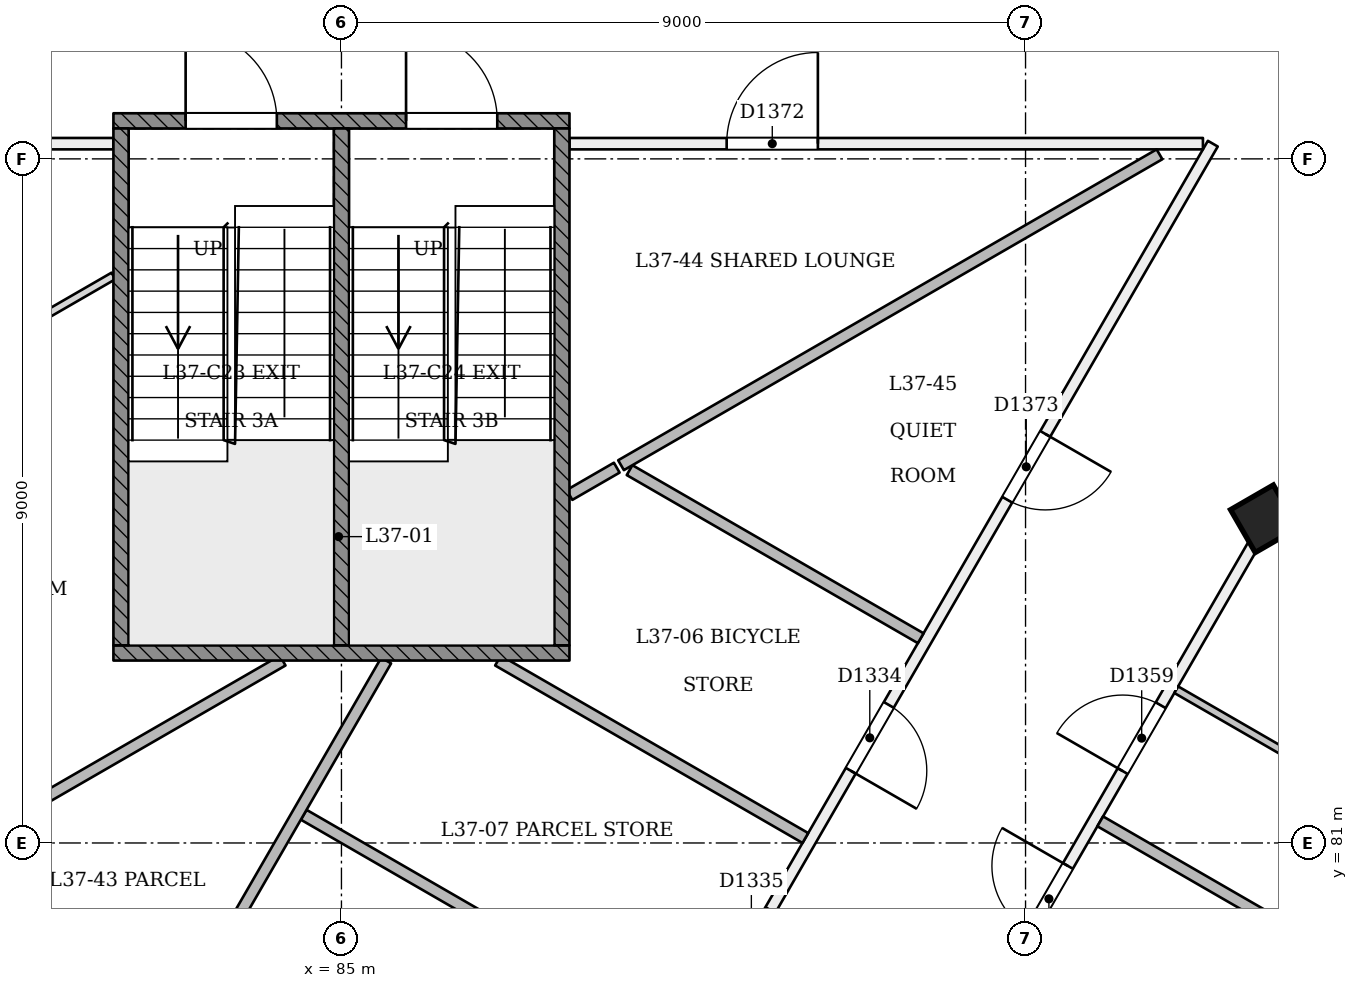
"""IFC4 building model, lengths in metres.
Left out: names, types, materials, properties, quantities, classifications, styles, units other than length and angle.
Written with IfcOpenShell. Run it as: python <this file> out.ifc"""

import sys

from ifc_helpers import new_model, si_unit, direction, frame, frame_2d, origin, origin_2d, place, context, subcontext, project, spatial, rectangle, extrude, element, fill, save


model = new_model("IFC4")
c1 = context("Model", 3, precision=1e-05, world=origin(), true_north=direction((0.0, 1.0)))
c2 = subcontext(c1, "Body", "Model", "MODEL_VIEW")
j1 = project(units=[si_unit("LENGTHUNIT", "METRE"), si_unit("PLANEANGLEUNIT", "RADIAN")], contexts=[c1])
p1 = place(None, origin())
s1 = spatial("IfcSite", under=j1, at=p1, CompositionType="ELEMENT")
p2 = place(p1, origin())
s2 = spatial("IfcBuilding", under=s1, at=p2, CompositionType="ELEMENT")
p3 = place(p2, frame((0.0, 0.0, 145.8)))
s3 = spatial("IfcBuildingStorey", under=s2, at=p3, CompositionType="ELEMENT", Elevation=145.8)
p4 = place(p3, frame((97.168, 85.218, -0.02), z_axis=(-0.02222134892, 0.038480872521, 0.999012229206), x_axis=(-0.500174592943, -0.865639497158, 0.022217955235)))
e1 = element("IfcColumn", 1, at=p4, inside=s3, PredefinedType="COLUMN", context=c2, shape_type="SweptSolid", body=[
    extrude(rectangle(XDim=0.65, YDim=0.65, at=origin_2d()), origin(), (0.0, 0.0, 1.0), 3.604),
])
p5 = place(p3, frame((73.666, 90.2, 0.0), z_axis=(0.0, 0.0, 1.0), x_axis=(1.0, 0.0, 0.0)))
e2 = element("IfcWall", 2, at=p5, inside=s3, PredefinedType="PARTITIONING", context=c2, shape_type="SweptSolid", body=[
    extrude(rectangle(XDim=8.334, YDim=0.15, at=frame_2d((4.167, 0.0))), origin(), (0.0, 0.0, 1.0), 3.15),
])
p6 = place(p5, frame((5.452, 0.0, 0.0)))
e3 = element("IfcOpeningElement", 3, at=p6, cuts=e2, PredefinedType="OPENING", context=c2, shape_type="SweptSolid", body=[
    extrude(rectangle(XDim=0.9, YDim=2.1, at=frame_2d((0.45, 1.05))), frame((0.0, 0.085, 0.0), z_axis=(0.0, -1.0, 0.0), x_axis=(1.0, 0.0, 0.0)), (0.0, 0.0, 1.0), 0.171),
])
p7 = place(p3, frame((96.464, 90.2, 0.0), z_axis=(0.0, 0.0, 1.0), x_axis=(-0.50000081944, -0.86602493068, 0.0)))
e4 = element("IfcWall", 4, at=p7, inside=s3, PredefinedType="PARTITIONING", context=c2, shape_type="SweptSolid", body=[
    extrude(rectangle(XDim=22.928, YDim=0.15, at=frame_2d((11.464, 0.0))), origin(), (0.0, 0.0, 1.0), 3.15),
])
p8 = place(p7, frame((15.191, 0.0, 0.0)))
e5 = element("IfcOpeningElement", 5, at=p8, cuts=e4, PredefinedType="OPENING", context=c2, shape_type="SweptSolid", body=[
    extrude(rectangle(XDim=0.9, YDim=2.1, at=frame_2d((0.45, 1.05))), frame((0.0, 0.085, 0.0), z_axis=(0.0, -1.0, 0.0), x_axis=(1.0, 0.0, 0.0)), (0.0, 0.0, 1.0), 0.171),
])
p9 = place(p7, frame((19.386, 0.0, 0.0)))
e6 = element("IfcOpeningElement", 6, at=p9, cuts=e4, PredefinedType="OPENING", context=c2, shape_type="SweptSolid", body=[
    extrude(rectangle(XDim=1.0, YDim=2.1, at=frame_2d((0.5, 1.05))), frame((0.0, 0.085, 0.0), z_axis=(0.0, -1.0, 0.0), x_axis=(1.0, 0.0, 0.0)), (0.0, 0.0, 1.0), 0.171),
])
p10 = place(p7, frame((8.526, 0.0, 0.0)))
e7 = element("IfcOpeningElement", 7, at=p10, cuts=e4, PredefinedType="OPENING", context=c2, shape_type="SweptSolid", body=[
    extrude(rectangle(XDim=1.0, YDim=2.1, at=frame_2d((0.5, 1.05))), frame((0.0, 0.085, 0.0), z_axis=(0.0, -1.0, 0.0), x_axis=(1.0, 0.0, 0.0)), (0.0, 0.0, 1.0), 0.171),
])
p11 = place(p7, frame((11.642, 0.0, 0.0)))
e8 = element("IfcOpeningElement", 8, at=p11, cuts=e4, PredefinedType="OPENING", context=c2, shape_type="SweptSolid", body=[
    extrude(rectangle(XDim=1.0, YDim=2.1, at=frame_2d((0.5, 1.05))), frame((0.0, 0.085, 0.0), z_axis=(0.0, -1.0, 0.0), x_axis=(1.0, 0.0, 0.0)), (0.0, 0.0, 1.0), 0.171),
])
p12 = place(p7, frame((4.409, 0.0, 0.0)))
e9 = element("IfcOpeningElement", 9, at=p12, cuts=e4, PredefinedType="OPENING", context=c2, shape_type="SweptSolid", body=[
    extrude(rectangle(XDim=1.0, YDim=2.1, at=frame_2d((0.5, 1.05))), frame((0.0, 0.085, 0.0), z_axis=(0.0, -1.0, 0.0), x_axis=(1.0, 0.0, 0.0)), (0.0, 0.0, 1.0), 0.171),
])
p13 = place(p3, frame((84.935, 70.457, 0.0), z_axis=(0.0, 0.0, 1.0), x_axis=(-0.50000209693, 0.866024193118, 0.0)))
e10 = element("IfcWall", 10, at=p13, inside=s3, PredefinedType="PARTITIONING", context=c2, shape_type="SweptSolid", body=[
    extrude(rectangle(XDim=22.798, YDim=0.15, at=frame_2d((11.399, 0.0))), origin(), (0.0, 0.0, 1.0), 3.15),
])
p14 = place(p13, frame((19.283, 0.0, 0.0)))
e11 = element("IfcOpeningElement", 11, at=p14, cuts=e10, PredefinedType="OPENING", context=c2, shape_type="SweptSolid", body=[
    extrude(rectangle(XDim=1.0, YDim=2.1, at=frame_2d((0.5, 1.05))), frame((0.0, 0.085, 0.0), z_axis=(0.0, -1.0, 0.0), x_axis=(1.0, 0.0, 0.0)), (0.0, 0.0, 1.0), 0.171),
])
p15 = place(p13, frame((13.973, 0.0, 0.0)))
e12 = element("IfcOpeningElement", 12, at=p15, cuts=e10, PredefinedType="OPENING", context=c2, shape_type="SweptSolid", body=[
    extrude(rectangle(XDim=1.0, YDim=2.1, at=frame_2d((0.5, 1.05))), frame((0.0, 0.085, 0.0), z_axis=(0.0, -1.0, 0.0), x_axis=(1.0, 0.0, 0.0)), (0.0, 0.0, 1.0), 0.171),
])
p16 = place(p13, frame((5.691, 0.0, 0.0)))
e13 = element("IfcOpeningElement", 13, at=p16, cuts=e10, PredefinedType="OPENING", context=c2, shape_type="SweptSolid", body=[
    extrude(rectangle(XDim=1.0, YDim=2.1, at=frame_2d((0.5, 1.05))), frame((0.0, 0.085, 0.0), z_axis=(0.0, -1.0, 0.0), x_axis=(1.0, 0.0, 0.0)), (0.0, 0.0, 1.0), 0.171),
])
p17 = place(p13, frame((9.424, 0.0, 0.0)))
e14 = element("IfcOpeningElement", 14, at=p17, cuts=e10, PredefinedType="OPENING", context=c2, shape_type="SweptSolid", body=[
    extrude(rectangle(XDim=1.0, YDim=2.1, at=frame_2d((0.5, 1.05))), frame((0.0, 0.085, 0.0), z_axis=(0.0, -1.0, 0.0), x_axis=(1.0, 0.0, 0.0)), (0.0, 0.0, 1.0), 0.171),
])
p18 = place(p3, frame((66.082, 96.91, 0.0), z_axis=(0.0, 0.0, 1.0), x_axis=(0.500001949747, -0.866024278094, 0.0)))
e15 = element("IfcWall", 15, at=p18, inside=s3, PredefinedType="PARTITIONING", context=c2, shape_type="SweptSolid", body=[
    extrude(rectangle(XDim=37.705, YDim=0.15, at=frame_2d((18.853, 0.0))), origin(), (0.0, 0.0, 1.0), 2.75),
])
p19 = place(p18, frame((1.75, 0.0, 0.0)))
e16 = element("IfcOpeningElement", 16, at=p19, cuts=e15, PredefinedType="OPENING", context=c2, shape_type="SweptSolid", body=[
    extrude(rectangle(XDim=1.0, YDim=2.1, at=frame_2d((0.5, 1.05))), frame((0.0, 0.085, 0.0), z_axis=(0.0, -1.0, 0.0), x_axis=(1.0, 0.0, 0.0)), (0.0, 0.0, 1.0), 0.171),
])
p20 = place(p18, frame((7.329, 0.0, 0.0)))
e17 = element("IfcOpeningElement", 17, at=p20, cuts=e15, PredefinedType="OPENING", context=c2, shape_type="SweptSolid", body=[
    extrude(rectangle(XDim=1.1, YDim=2.1, at=frame_2d((0.55, 1.05))), frame((0.0, 0.085, 0.0), z_axis=(0.0, -1.0, 0.0), x_axis=(1.0, 0.0, 0.0)), (0.0, 0.0, 1.0), 0.171),
])
p21 = place(p18, frame((9.72, 0.0, 0.0)))
e18 = element("IfcOpeningElement", 18, at=p21, cuts=e15, PredefinedType="OPENING", context=c2, shape_type="SweptSolid", body=[
    extrude(rectangle(XDim=1.0, YDim=2.1, at=frame_2d((0.5, 1.05))), frame((0.0, 0.085, 0.0), z_axis=(0.0, -1.0, 0.0), x_axis=(1.0, 0.0, 0.0)), (0.0, 0.0, 1.0), 0.171),
])
p22 = place(p18, frame((16.28, 0.0, 0.0)))
e19 = element("IfcOpeningElement", 19, at=p22, cuts=e15, PredefinedType="OPENING", context=c2, shape_type="SweptSolid", body=[
    extrude(rectangle(XDim=1.0, YDim=2.1, at=frame_2d((0.5, 1.05))), frame((0.0, 0.085, 0.0), z_axis=(0.0, -1.0, 0.0), x_axis=(1.0, 0.0, 0.0)), (0.0, 0.0, 1.0), 0.171),
])
p23 = place(p18, frame((18.72, 0.0, 0.0)))
e20 = element("IfcOpeningElement", 20, at=p23, cuts=e15, PredefinedType="OPENING", context=c2, shape_type="SweptSolid", body=[
    extrude(rectangle(XDim=1.0, YDim=2.1, at=frame_2d((0.5, 1.05))), frame((0.0, 0.085, 0.0), z_axis=(0.0, -1.0, 0.0), x_axis=(1.0, 0.0, 0.0)), (0.0, 0.0, 1.0), 0.171),
])
p24 = place(p18, frame((25.28, 0.0, 0.0)))
e21 = element("IfcOpeningElement", 21, at=p24, cuts=e15, PredefinedType="OPENING", context=c2, shape_type="SweptSolid", body=[
    extrude(rectangle(XDim=1.0, YDim=2.1, at=frame_2d((0.5, 1.05))), frame((0.0, 0.085, 0.0), z_axis=(0.0, -1.0, 0.0), x_axis=(1.0, 0.0, 0.0)), (0.0, 0.0, 1.0), 0.171),
])
p25 = place(p18, frame((27.72, 0.0, 0.0)))
e22 = element("IfcOpeningElement", 22, at=p25, cuts=e15, PredefinedType="OPENING", context=c2, shape_type="SweptSolid", body=[
    extrude(rectangle(XDim=1.0, YDim=2.1, at=frame_2d((0.5, 1.05))), frame((0.0, 0.085, 0.0), z_axis=(0.0, -1.0, 0.0), x_axis=(1.0, 0.0, 0.0)), (0.0, 0.0, 1.0), 0.171),
])
p26 = place(p18, frame((34.329, 0.0, 0.0)))
e23 = element("IfcOpeningElement", 23, at=p26, cuts=e15, PredefinedType="OPENING", context=c2, shape_type="SweptSolid", body=[
    extrude(rectangle(XDim=1.1, YDim=2.1, at=frame_2d((0.55, 1.05))), frame((0.0, 0.085, 0.0), z_axis=(0.0, -1.0, 0.0), x_axis=(1.0, 0.0, 0.0)), (0.0, 0.0, 1.0), 0.171),
])
p27 = place(p3, frame((85.0, 64.144, 0.0), z_axis=(0.0, 0.0, 1.0), x_axis=(0.50000053273, 0.866025096212, 0.0)))
e24 = element("IfcWall", 24, at=p27, inside=s3, PredefinedType="PARTITIONING", context=c2, shape_type="SweptSolid", body=[
    extrude(rectangle(XDim=39.671, YDim=0.15, at=frame_2d((19.835, 0.0))), origin(), (0.0, 0.0, 1.0), 2.75),
])
p28 = place(p27, frame((0.618, 0.0, 0.0)))
e25 = element("IfcOpeningElement", 25, at=p28, cuts=e24, PredefinedType="OPENING", context=c2, shape_type="SweptSolid", body=[
    extrude(rectangle(XDim=1.2, YDim=2.1, at=frame_2d((0.6, 1.05))), frame((0.0, 0.085, 0.0), z_axis=(0.0, -1.0, 0.0), x_axis=(1.0, 0.0, 0.0)), (0.0, 0.0, 1.0), 0.171),
])
p29 = place(p27, frame((9.115, 0.0, 0.0)))
e26 = element("IfcOpeningElement", 26, at=p29, cuts=e24, PredefinedType="OPENING", context=c2, shape_type="SweptSolid", body=[
    extrude(rectangle(XDim=1.0, YDim=2.1, at=frame_2d((0.5, 1.05))), frame((0.0, 0.085, 0.0), z_axis=(0.0, -1.0, 0.0), x_axis=(1.0, 0.0, 0.0)), (0.0, 0.0, 1.0), 0.171),
])
p30 = place(p27, frame((11.556, 0.0, 0.0)))
e27 = element("IfcOpeningElement", 27, at=p30, cuts=e24, PredefinedType="OPENING", context=c2, shape_type="SweptSolid", body=[
    extrude(rectangle(XDim=1.0, YDim=2.1, at=frame_2d((0.5, 1.05))), frame((0.0, 0.085, 0.0), z_axis=(0.0, -1.0, 0.0), x_axis=(1.0, 0.0, 0.0)), (0.0, 0.0, 1.0), 0.171),
])
p31 = place(p27, frame((18.115, 0.0, 0.0)))
e28 = element("IfcOpeningElement", 28, at=p31, cuts=e24, PredefinedType="OPENING", context=c2, shape_type="SweptSolid", body=[
    extrude(rectangle(XDim=1.0, YDim=2.1, at=frame_2d((0.5, 1.05))), frame((0.0, 0.085, 0.0), z_axis=(0.0, -1.0, 0.0), x_axis=(1.0, 0.0, 0.0)), (0.0, 0.0, 1.0), 0.171),
])
p32 = place(p27, frame((20.556, 0.0, 0.0)))
e29 = element("IfcOpeningElement", 29, at=p32, cuts=e24, PredefinedType="OPENING", context=c2, shape_type="SweptSolid", body=[
    extrude(rectangle(XDim=1.0, YDim=2.1, at=frame_2d((0.5, 1.05))), frame((0.0, 0.085, 0.0), z_axis=(0.0, -1.0, 0.0), x_axis=(1.0, 0.0, 0.0)), (0.0, 0.0, 1.0), 0.171),
])
p33 = place(p27, frame((27.115, 0.0, 0.0)))
e30 = element("IfcOpeningElement", 30, at=p33, cuts=e24, PredefinedType="OPENING", context=c2, shape_type="SweptSolid", body=[
    extrude(rectangle(XDim=1.0, YDim=2.1, at=frame_2d((0.5, 1.05))), frame((0.0, 0.085, 0.0), z_axis=(0.0, -1.0, 0.0), x_axis=(1.0, 0.0, 0.0)), (0.0, 0.0, 1.0), 0.171),
])
p34 = place(p27, frame((30.585, 0.0, 0.0)))
e31 = element("IfcOpeningElement", 31, at=p34, cuts=e24, PredefinedType="OPENING", context=c2, shape_type="SweptSolid", body=[
    extrude(rectangle(XDim=1.0, YDim=2.1, at=frame_2d((0.5, 1.05))), frame((0.0, 0.085, 0.0), z_axis=(0.0, -1.0, 0.0), x_axis=(1.0, 0.0, 0.0)), (0.0, 0.0, 1.0), 0.171),
])
p35 = place(p27, frame((36.164, 0.0, 0.0)))
e32 = element("IfcOpeningElement", 32, at=p35, cuts=e24, PredefinedType="OPENING", context=c2, shape_type="SweptSolid", body=[
    extrude(rectangle(XDim=1.1, YDim=2.1, at=frame_2d((0.55, 1.05))), frame((0.0, 0.085, 0.0), z_axis=(0.0, -1.0, 0.0), x_axis=(1.0, 0.0, 0.0)), (0.0, 0.0, 1.0), 0.171),
])
p36 = place(p27, frame((38.271, 0.0, 0.0)))
e33 = element("IfcOpeningElement", 33, at=p36, cuts=e24, PredefinedType="OPENING", context=c2, shape_type="SweptSolid", body=[
    extrude(rectangle(XDim=1.2, YDim=2.1, at=frame_2d((0.6, 1.05))), frame((0.0, 0.085, 0.0), z_axis=(0.0, -1.0, 0.0), x_axis=(1.0, 0.0, 0.0)), (0.0, 0.0, 1.0), 0.171),
])
p37 = place(p3, frame((88.0, 90.2, 0.0), z_axis=(0.0, 0.0, 1.0), x_axis=(1.0, 0.0, 0.0)))
e34 = element("IfcWall", 34, at=p37, inside=s3, PredefinedType="PARTITIONING", context=c2, shape_type="SweptSolid", body=[
    extrude(rectangle(XDim=8.334, YDim=0.15, at=frame_2d((4.167, 0.0))), origin(), (0.0, 0.0, 1.0), 3.15),
])
p38 = place(p37, frame((2.068, 0.0, 0.0)))
e35 = element("IfcOpeningElement", 35, at=p38, cuts=e34, PredefinedType="OPENING", context=c2, shape_type="SweptSolid", body=[
    extrude(rectangle(XDim=1.2, YDim=2.1, at=frame_2d((0.6, 1.05))), frame((0.0, 0.085, 0.0), z_axis=(0.0, -1.0, 0.0), x_axis=(1.0, 0.0, 0.0)), (0.0, 0.0, 1.0), 0.171),
])
p39 = place(p3, frame((77.71, 85.983, 0.0), z_axis=(0.0, 0.0, 1.0), x_axis=(0.866029649098, 0.49999264683, 0.0)))
e36 = element("IfcWall", 36, at=p39, inside=s3, PredefinedType="PARTITIONING", context=c2, shape_type="SweptSolid", body=[
    extrude(rectangle(XDim=4.954, YDim=0.1, at=frame_2d((2.477, 0.0))), origin(), (0.0, 0.0, 1.0), 3.15),
])
p40 = place(p3, frame((87.06, 83.4, 0.0), z_axis=(0.0, 0.0, 1.0), x_axis=(0.866040176992, -0.499974411181, 0.0)))
e37 = element("IfcWall", 37, at=p40, inside=s3, PredefinedType="PARTITIONING", context=c2, shape_type="SweptSolid", body=[
    extrude(rectangle(XDim=4.669, YDim=0.15, at=frame_2d((2.334, 0.0))), origin(), (0.0, 0.0, 1.0), 3.15),
])
p41 = place(p3, frame((88.622, 85.938, 0.0), z_axis=(0.0, 0.0, 1.0), x_axis=(-0.866100656052, -0.499869636591, 0.0)))
e38 = element("IfcWall", 38, at=p41, inside=s3, PredefinedType="PARTITIONING", context=c2, shape_type="SweptSolid", body=[
    extrude(rectangle(XDim=0.718, YDim=0.15, at=frame_2d((0.359, 0.0))), origin(), (0.0, 0.0, 1.0), 3.15),
])
p42 = place(p3, frame((92.621, 83.694, 0.0), z_axis=(0.0, 0.0, 1.0), x_axis=(-0.866012759228, 0.500021900375, 0.0)))
e39 = element("IfcWall", 39, at=p42, inside=s3, PredefinedType="PARTITIONING", context=c2, shape_type="SweptSolid", body=[
    extrude(rectangle(XDim=4.423, YDim=0.15, at=frame_2d((2.211, 0.0))), origin(), (0.0, 0.0, 1.0), 3.15),
])
p43 = place(p3, frame((84.503, 81.371, 0.0), z_axis=(0.0, 0.0, 1.0), x_axis=(0.866042852854, -0.499969776107, 0.0)))
e40 = element("IfcWall", 40, at=p43, inside=s3, PredefinedType="PARTITIONING", context=c2, shape_type="SweptSolid", body=[
    extrude(rectangle(XDim=2.934, YDim=0.15, at=frame_2d((1.467, 0.0))), origin(), (0.0, 0.0, 1.0), 3.15),
])
p44 = place(p3, frame((100.478, 78.112, 0.0), z_axis=(0.0, 0.0, 1.0), x_axis=(-0.866025401434, 0.500000004071, 0.0)))
e41 = element("IfcWall", 41, at=p44, inside=s3, PredefinedType="PARTITIONING", context=c2, shape_type="SweptSolid", body=[
    extrude(rectangle(XDim=6.345, YDim=0.15, at=frame_2d((3.173, 0.0))), origin(), (0.0, 0.0, 1.0), 2.65),
])
p45 = place(p3, frame((98.429, 81.604, 0.0), z_axis=(0.0, 0.0, 1.0), x_axis=(-0.866011447264, 0.500024172624, 0.0)))
e42 = element("IfcWall", 42, at=p45, inside=s3, PredefinedType="PARTITIONING", context=c2, shape_type="SweptSolid", body=[
    extrude(rectangle(XDim=2.825, YDim=0.1, at=frame_2d((1.413, 0.0))), origin(), (0.0, 0.0, 1.0), 3.15),
])
p46 = place(p3, frame((99.636, 83.794, 0.0), z_axis=(0.0, 0.0, 1.0), x_axis=(-0.866042014628, 0.499971228071, 0.0)))
e43 = element("IfcWall", 43, at=p46, inside=s3, PredefinedType="PARTITIONING", context=c2, shape_type="SweptSolid", body=[
    extrude(rectangle(XDim=2.775, YDim=0.1, at=frame_2d((1.388, 0.0))), origin(), (0.0, 0.0, 1.0), 2.75),
])
p47 = place(p3, frame((79.218, 80.508, 0.0), z_axis=(0.0, 0.0, 1.0), x_axis=(0.866031632846, 0.499989210794, 0.0)))
e44 = element("IfcWall", 44, at=p47, inside=s3, PredefinedType="PARTITIONING", context=c2, shape_type="SweptSolid", body=[
    extrude(rectangle(XDim=5.783, YDim=0.15, at=frame_2d((2.892, 0.0))), origin(), (0.0, 0.0, 1.0), 3.15),
])
p48 = place(p3, frame((85.588, 83.4, 0.0), z_axis=(0.0, 0.0, 1.0), x_axis=(-0.500000846469, -0.866024915075, 0.0)))
e45 = element("IfcWall", 45, at=p48, inside=s3, PredefinedType="PARTITIONING", context=c2, shape_type="SweptSolid", body=[
    extrude(rectangle(XDim=7.996, YDim=0.15, at=frame_2d((3.998, 0.0))), origin(), (0.0, 0.0, 1.0), 3.15),
])
p49 = place(p3, frame((88.678, 85.97, 0.0), z_axis=(0.0, 0.0, 1.0), x_axis=(0.866017590096, 0.50001353346, 0.0)))
e46 = element("IfcWall", 46, at=p49, inside=s3, PredefinedType="PARTITIONING", context=c2, shape_type="SweptSolid", body=[
    extrude(rectangle(XDim=8.18, YDim=0.15, at=frame_2d((4.09, 0.0))), origin(), (0.0, 0.0, 1.0), 3.15),
])
p50 = place(p3, frame((82.0, 90.5, 0.0), z_axis=(0.0, 0.0, 1.0), x_axis=(1.0, 0.0, 0.0)))
e47 = element("IfcWall", 47, at=p50, inside=s3, PredefinedType="SOLIDWALL", context=c2, shape_type="SweptSolid", body=[
    extrude(rectangle(XDim=6.0, YDim=0.2, at=frame_2d((3.0, 0.0))), origin(), (0.0, 0.0, 1.0), 3.15),
])
p51 = place(p50, frame((0.95, 0.0, 0.0)))
e48 = element("IfcOpeningElement", 48, at=p51, cuts=e47, PredefinedType="OPENING", context=c2, shape_type="SweptSolid", body=[
    extrude(rectangle(XDim=1.2, YDim=2.1, at=frame_2d((0.6, 1.05))), frame((0.0, 0.11, 0.0), z_axis=(0.0, -1.0, 0.0), x_axis=(1.0, 0.0, 0.0)), (0.0, 0.0, 1.0), 0.221),
])
p52 = place(p50, frame((3.85, 0.0, 0.0)))
e49 = element("IfcOpeningElement", 49, at=p52, cuts=e47, PredefinedType="OPENING", context=c2, shape_type="SweptSolid", body=[
    extrude(rectangle(XDim=1.2, YDim=2.1, at=frame_2d((0.6, 1.05))), frame((0.0, 0.11, 0.0), z_axis=(0.0, -1.0, 0.0), x_axis=(1.0, 0.0, 0.0)), (0.0, 0.0, 1.0), 0.221),
])
p53 = place(p3, frame((82.0, 83.5, 0.0), z_axis=(0.0, 0.0, 1.0), x_axis=(1.0, 0.0, 0.0)))
e50 = element("IfcWall", 50, at=p53, inside=s3, PredefinedType="SOLIDWALL", context=c2, shape_type="SweptSolid", body=[
    extrude(rectangle(XDim=6.0, YDim=0.2, at=frame_2d((3.0, 0.0))), origin(), (0.0, 0.0, 1.0), 3.15),
])
for number, where, z_axis, x_axis in (
    (51, (82.1, 83.6, 0.0), (0.0, 0.0, 1.0), (0.0, 1.0, 0.0)),
    (52, (87.9, 83.6, 0.0), (0.0, 0.0, 1.0), (0.0, 1.0, 0.0)),
    (53, (85.0, 83.6, 0.0), (0.0, 0.0, 1.0), (0.0, 1.0, 0.0)),
):
    element("IfcWall", number, at=place(p3, frame(where, z_axis=z_axis, x_axis=x_axis)), inside=s3, PredefinedType="SOLIDWALL", context=c2, shape_type="SweptSolid", body=[
        extrude(rectangle(XDim=6.8, YDim=0.2, at=frame_2d((3.4, 0.0))), origin(), (0.0, 0.0, 1.0), 3.15),
    ])
p54 = place(p10, origin())
e54 = element("IfcDoor", 54, at=p54, inside=s3, OperationType="SINGLE_SWING_RIGHT", PredefinedType="NOTDEFINED", context=c2, shape_type="SweptSolid", body=[
    extrude(rectangle(XDim=1.0, YDim=2.1, at=frame_2d((0.5, 1.05))), frame((0.0, 0.025, 0.0), z_axis=(0.0, -1.0, 0.0), x_axis=(1.0, 0.0, 0.0)), (0.0, 0.0, 1.0), 0.05),
])
fill(e7, e54)
p55 = place(p31, origin())
e55 = element("IfcDoor", 55, at=p55, inside=s3, OperationType="SINGLE_SWING_RIGHT", PredefinedType="NOTDEFINED", context=c2, shape_type="SweptSolid", body=[
    extrude(rectangle(XDim=1.0, YDim=2.1, at=frame_2d((0.5, 1.05))), frame((0.0, 0.025, 0.0), z_axis=(0.0, -1.0, 0.0), x_axis=(1.0, 0.0, 0.0)), (0.0, 0.0, 1.0), 0.05),
])
fill(e28, e55)
p56 = place(p32, origin())
e56 = element("IfcDoor", 56, at=p56, inside=s3, OperationType="SINGLE_SWING_LEFT", PredefinedType="NOTDEFINED", context=c2, shape_type="SweptSolid", body=[
    extrude(rectangle(XDim=1.0, YDim=2.1, at=frame_2d((0.5, 1.05))), frame((0.0, 0.025, 0.0), z_axis=(0.0, -1.0, 0.0), x_axis=(1.0, 0.0, 0.0)), (0.0, 0.0, 1.0), 0.05),
])
fill(e29, e56)
p57 = place(p38, origin())
e57 = element("IfcDoor", 57, at=p57, inside=s3, OperationType="SINGLE_SWING_RIGHT", PredefinedType="NOTDEFINED", context=c2, shape_type="SweptSolid", body=[
    extrude(rectangle(XDim=1.2, YDim=2.1, at=frame_2d((0.6, 1.05))), frame((0.0, 0.025, 0.0), z_axis=(0.0, -1.0, 0.0), x_axis=(1.0, 0.0, 0.0)), (0.0, 0.0, 1.0), 0.05),
])
fill(e35, e57)
p58 = place(p12, origin())
e58 = element("IfcDoor", 58, at=p58, inside=s3, OperationType="SINGLE_SWING_LEFT", PredefinedType="NOTDEFINED", context=c2, shape_type="SweptSolid", body=[
    extrude(rectangle(XDim=1.0, YDim=2.1, at=frame_2d((0.5, 1.05))), frame((0.0, 0.025, 0.0), z_axis=(0.0, -1.0, 0.0), x_axis=(1.0, 0.0, 0.0)), (0.0, 0.0, 1.0), 0.05),
])
fill(e9, e58)
p59 = place(p51, origin())
e59 = element("IfcDoor", 59, at=p59, inside=s3, OperationType="SINGLE_SWING_LEFT", PredefinedType="NOTDEFINED", context=c2, shape_type="SweptSolid", body=[
    extrude(rectangle(XDim=1.2, YDim=2.1, at=frame_2d((0.6, 1.05))), frame((0.0, 0.025, 0.0), z_axis=(0.0, -1.0, 0.0), x_axis=(1.0, 0.0, 0.0)), (0.0, 0.0, 1.0), 0.05),
])
fill(e48, e59)
p60 = place(p52, origin())
e60 = element("IfcDoor", 60, at=p60, inside=s3, OperationType="SINGLE_SWING_LEFT", PredefinedType="NOTDEFINED", context=c2, shape_type="SweptSolid", body=[
    extrude(rectangle(XDim=1.2, YDim=2.1, at=frame_2d((0.6, 1.05))), frame((0.0, 0.025, 0.0), z_axis=(0.0, -1.0, 0.0), x_axis=(1.0, 0.0, 0.0)), (0.0, 0.0, 1.0), 0.05),
])
fill(e49, e60)
save(model, sys.argv[1])
